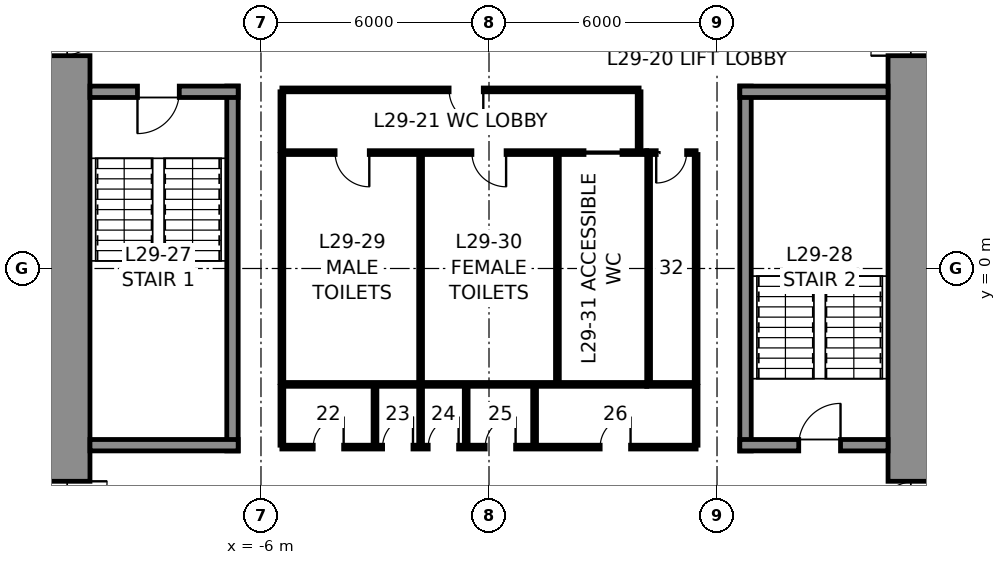
"""IFC4 building model, lengths in metres.
Left out: names, types, materials, properties, quantities, classifications, styles, units other than length and angle.
Written with IfcOpenShell. Run it as: python <this file> out.ifc"""

import sys

from ifc_helpers import new_model, si_unit, direction, frame, frame_2d, origin, place, context, subcontext, project, spatial, rectangle, extrude, element, fill, save


model = new_model("IFC4")
c1 = context("Model", 3, precision=1e-05, world=origin(), true_north=direction((0.0, 1.0)))
c2 = subcontext(c1, "Body", "Model", "MODEL_VIEW")
j1 = project(units=[si_unit("LENGTHUNIT", "METRE"), si_unit("PLANEANGLEUNIT", "RADIAN")], contexts=[c1])
p1 = place(None, origin())
s1 = spatial("IfcSite", under=j1, at=p1, CompositionType="ELEMENT")
p2 = place(p1, origin())
s2 = spatial("IfcBuilding", under=s1, at=p2, CompositionType="ELEMENT")
p3 = place(p2, frame((0.0, 0.0, 143.8)))
s3 = spatial("IfcBuildingStorey", under=s2, at=p3, CompositionType="ELEMENT", Elevation=143.8)
p4 = place(p3, frame((11.25, 10.5, 0.0), z_axis=(0.0, 0.0, 1.0), x_axis=(0.0, -1.0, 0.0)))
e1 = element("IfcWall", 1, at=p4, inside=s3, PredefinedType="SHEAR", context=c2, shape_type="SweptSolid", body=[
    extrude(rectangle(XDim=21.0, YDim=1.5, at=frame_2d((10.5, 0.0))), origin(), (0.0, 0.0, 1.0), 4.0),
])
p5 = place(p4, frame((3.7, 0.0, 0.0)))
e2 = element("IfcOpeningElement", 2, at=p5, cuts=e1, PredefinedType="OPENING", context=c2, shape_type="SweptSolid", body=[
    extrude(rectangle(XDim=1.2, YDim=2.3, at=frame_2d((0.6, 1.15))), frame((0.0, 0.76, 0.0), z_axis=(0.0, -1.0, 0.0), x_axis=(1.0, 0.0, 0.0)), (0.0, 0.0, 1.0), 1.52),
])
p6 = place(p4, frame((16.1, 0.0, 0.0)))
e3 = element("IfcOpeningElement", 3, at=p6, cuts=e1, PredefinedType="OPENING", context=c2, shape_type="SweptSolid", body=[
    extrude(rectangle(XDim=1.2, YDim=2.3, at=frame_2d((0.6, 1.15))), frame((0.0, 0.76, 0.0), z_axis=(0.0, -1.0, 0.0), x_axis=(1.0, 0.0, 0.0)), (0.0, 0.0, 1.0), 1.52),
])
p7 = place(p3, frame((-11.25, -10.5, 0.0), z_axis=(0.0, 0.0, 1.0), x_axis=(0.0, 1.0, 0.0)))
e4 = element("IfcWall", 4, at=p7, inside=s3, PredefinedType="SHEAR", context=c2, shape_type="SweptSolid", body=[
    extrude(rectangle(XDim=21.0, YDim=1.5, at=frame_2d((10.5, 0.0))), origin(), (0.0, 0.0, 1.0), 4.0),
])
p8 = place(p7, frame((16.1, 0.0, 0.0)))
e5 = element("IfcOpeningElement", 5, at=p8, cuts=e4, PredefinedType="OPENING", context=c2, shape_type="SweptSolid", body=[
    extrude(rectangle(XDim=1.2, YDim=2.3, at=frame_2d((0.6, 1.15))), frame((0.0, 0.76, 0.0), z_axis=(0.0, -1.0, 0.0), x_axis=(1.0, 0.0, 0.0)), (0.0, 0.0, 1.0), 1.52),
])
p9 = place(p7, frame((3.7, 0.0, 0.0)))
e6 = element("IfcOpeningElement", 6, at=p9, cuts=e4, PredefinedType="OPENING", context=c2, shape_type="SweptSolid", body=[
    extrude(rectangle(XDim=1.2, YDim=2.3, at=frame_2d((0.6, 1.15))), frame((0.0, 0.76, 0.0), z_axis=(0.0, -1.0, 0.0), x_axis=(1.0, 0.0, 0.0)), (0.0, 0.0, 1.0), 1.52),
])
p10 = place(p3, frame((-6.75, -4.8, 0.0), z_axis=(0.0, 0.0, 1.0), x_axis=(0.0, 1.0, 0.0)))
e7 = element("IfcWall", 7, at=p10, inside=s3, PredefinedType="SOLIDWALL", context=c2, shape_type="SweptSolid", body=[
    extrude(rectangle(XDim=9.6, YDim=0.3, at=frame_2d((4.8, 0.0))), origin(), (0.0, 0.0, 1.0), 3.75),
])
p11 = place(p3, frame((-10.5, 4.65, 0.0), z_axis=(0.0, 0.0, 1.0), x_axis=(1.0, 0.0, 0.0)))
e8 = element("IfcWall", 8, at=p11, inside=s3, PredefinedType="SOLIDWALL", context=c2, shape_type="SweptSolid", body=[
    extrude(rectangle(XDim=3.9, YDim=0.3, at=frame_2d((1.95, 0.0))), origin(), (0.0, 0.0, 1.0), 3.75),
])
p12 = place(p11, frame((1.25, 0.0, 0.0)))
e9 = element("IfcOpeningElement", 9, at=p12, cuts=e8, PredefinedType="OPENING", context=c2, shape_type="SweptSolid", body=[
    extrude(rectangle(XDim=1.1, YDim=2.3, at=frame_2d((0.55, 1.15))), frame((0.0, 0.16, 0.0), z_axis=(0.0, -1.0, 0.0), x_axis=(1.0, 0.0, 0.0)), (0.0, 0.0, 1.0), 0.32),
])
p13 = place(p3, frame((-6.6, -4.65, 0.0), z_axis=(0.0, 0.0, 1.0), x_axis=(-1.0, 0.0, 0.0)))
e10 = element("IfcWall", 10, at=p13, inside=s3, PredefinedType="SOLIDWALL", context=c2, shape_type="SweptSolid", body=[
    extrude(rectangle(XDim=3.9, YDim=0.3, at=frame_2d((1.95, 0.0))), origin(), (0.0, 0.0, 1.0), 3.75),
])
p14 = place(p3, frame((6.75, -4.8, 0.0), z_axis=(0.0, 0.0, 1.0), x_axis=(0.0, 1.0, 0.0)))
e11 = element("IfcWall", 11, at=p14, inside=s3, PredefinedType="SOLIDWALL", context=c2, shape_type="SweptSolid", body=[
    extrude(rectangle(XDim=9.6, YDim=0.3, at=frame_2d((4.8, 0.0))), origin(), (0.0, 0.0, 1.0), 3.75),
])
p15 = place(p3, frame((6.6, 4.65, 0.0), z_axis=(0.0, 0.0, 1.0), x_axis=(1.0, 0.0, 0.0)))
e12 = element("IfcWall", 12, at=p15, inside=s3, PredefinedType="SOLIDWALL", context=c2, shape_type="SweptSolid", body=[
    extrude(rectangle(XDim=3.9, YDim=0.3, at=frame_2d((1.95, 0.0))), origin(), (0.0, 0.0, 1.0), 3.75),
])
p16 = place(p3, frame((10.5, -4.65, 0.0), z_axis=(0.0, 0.0, 1.0), x_axis=(-1.0, 0.0, 0.0)))
e13 = element("IfcWall", 13, at=p16, inside=s3, PredefinedType="SOLIDWALL", context=c2, shape_type="SweptSolid", body=[
    extrude(rectangle(XDim=3.9, YDim=0.3, at=frame_2d((1.95, 0.0))), origin(), (0.0, 0.0, 1.0), 3.75),
])
p17 = place(p16, frame((1.25, 0.0, 0.0)))
e14 = element("IfcOpeningElement", 14, at=p17, cuts=e13, PredefinedType="OPENING", context=c2, shape_type="SweptSolid", body=[
    extrude(rectangle(XDim=1.1, YDim=2.3, at=frame_2d((0.55, 1.15))), frame((0.0, 0.16, 0.0), z_axis=(0.0, -1.0, 0.0), x_axis=(1.0, 0.0, 0.0)), (0.0, 0.0, 1.0), 0.32),
])
p18 = place(p3, frame((-5.45, 3.05, 0.0), z_axis=(0.0, 0.0, 1.0), x_axis=(1.0, 0.0, 0.0)))
e15 = element("IfcWall", 15, at=p18, inside=s3, PredefinedType="PARTITIONING", context=c2, shape_type="SweptSolid", body=[
    extrude(rectangle(XDim=9.6, YDim=0.1, at=frame_2d((4.8, 0.0))), origin(), (0.0, 0.0, 1.0), 3.75),
])
p19 = place(p18, frame((1.4, 0.0, 0.0)))
e16 = element("IfcOpeningElement", 16, at=p19, cuts=e15, PredefinedType="OPENING", context=c2, shape_type="SweptSolid", body=[
    extrude(rectangle(XDim=0.9, YDim=2.3, at=frame_2d((0.45, 1.15))), frame((0.0, 0.06, 0.0), z_axis=(0.0, -1.0, 0.0), x_axis=(1.0, 0.0, 0.0)), (0.0, 0.0, 1.0), 0.12),
])
p20 = place(p18, frame((5.0, 0.0, 0.0)))
e17 = element("IfcOpeningElement", 17, at=p20, cuts=e15, PredefinedType="OPENING", context=c2, shape_type="SweptSolid", body=[
    extrude(rectangle(XDim=0.9, YDim=2.3, at=frame_2d((0.45, 1.15))), frame((0.0, 0.06, 0.0), z_axis=(0.0, -1.0, 0.0), x_axis=(1.0, 0.0, 0.0)), (0.0, 0.0, 1.0), 0.12),
])
p21 = place(p18, frame((7.95, 0.0, 0.0)))
e18 = element("IfcOpeningElement", 18, at=p21, cuts=e15, PredefinedType="OPENING", context=c2, shape_type="SweptSolid", body=[
    extrude(rectangle(XDim=1.0, YDim=2.3, at=frame_2d((0.5, 1.15))), frame((0.0, 0.06, 0.0), z_axis=(0.0, -1.0, 0.0), x_axis=(1.0, 0.0, 0.0)), (0.0, 0.0, 1.0), 0.12),
])
p22 = place(p3, frame((4.15, 3.05, 0.0), z_axis=(0.0, 0.0, 1.0), x_axis=(1.0, 0.0, 0.0)))
e19 = element("IfcWall", 19, at=p22, inside=s3, PredefinedType="PARTITIONING", context=c2, shape_type="SweptSolid", body=[
    extrude(rectangle(XDim=1.3, YDim=0.1, at=frame_2d((0.65, 0.0))), origin(), (0.0, 0.0, 1.0), 3.75),
])
p23 = place(p22, frame((0.25, 0.0, 0.0)))
e20 = element("IfcOpeningElement", 20, at=p23, cuts=e19, PredefinedType="OPENING", context=c2, shape_type="SweptSolid", body=[
    extrude(rectangle(XDim=0.8, YDim=2.3, at=frame_2d((0.4, 1.15))), frame((0.0, 0.06, 0.0), z_axis=(0.0, -1.0, 0.0), x_axis=(1.0, 0.0, 0.0)), (0.0, 0.0, 1.0), 0.12),
])
p24 = place(p3, frame((4.15, -3.05, 0.0), z_axis=(0.0, 0.0, 1.0), x_axis=(-1.0, 0.0, 0.0)))
e21 = element("IfcWall", 21, at=p24, inside=s3, PredefinedType="PARTITIONING", context=c2, shape_type="SweptSolid", body=[
    extrude(rectangle(XDim=9.6, YDim=0.1, at=frame_2d((4.8, 0.0))), origin(), (0.0, 0.0, 1.0), 3.75),
])
p25 = place(p3, frame((5.45, -3.05, 0.0), z_axis=(0.0, 0.0, 1.0), x_axis=(-1.0, 0.0, 0.0)))
e22 = element("IfcWall", 22, at=p25, inside=s3, PredefinedType="PARTITIONING", context=c2, shape_type="SweptSolid", body=[
    extrude(rectangle(XDim=1.3, YDim=0.1, at=frame_2d((0.65, 0.0))), origin(), (0.0, 0.0, 1.0), 3.75),
])
for number, where, z_axis, x_axis in (
    (23, (5.45, 3.0, 0.0), (0.0, 0.0, 1.0), (0.0, -1.0, 0.0)),
    (24, (-5.45, -3.0, 0.0), (0.0, 0.0, 1.0), (0.0, 1.0, 0.0)),
    (25, (-1.8, -3.0, 0.0), (0.0, 0.0, 1.0), (0.0, 1.0, 0.0)),
    (26, (1.8, -3.0, 0.0), (0.0, 0.0, 1.0), (0.0, 1.0, 0.0)),
    (27, (4.2, -3.0, 0.0), (0.0, 0.0, 1.0), (0.0, 1.0, 0.0)),
):
    element("IfcWall", number, at=place(p3, frame(where, z_axis=z_axis, x_axis=x_axis)), inside=s3, PredefinedType="PARTITIONING", context=c2, shape_type="SweptSolid", body=[
        extrude(rectangle(XDim=6.0, YDim=0.1, at=frame_2d((3.0, 0.0))), origin(), (0.0, 0.0, 1.0), 3.75),
    ])
p26 = place(p3, frame((-5.45, 4.7, 0.0), z_axis=(0.0, 0.0, 1.0), x_axis=(1.0, 0.0, 0.0)))
e28 = element("IfcWall", 28, at=p26, inside=s3, PredefinedType="PARTITIONING", context=c2, shape_type="SweptSolid", body=[
    extrude(rectangle(XDim=9.4, YDim=0.1, at=frame_2d((4.7, 0.0))), origin(), (0.0, 0.0, 1.0), 3.75),
])
p27 = place(p26, frame((4.4, 0.0, 0.0)))
e29 = element("IfcOpeningElement", 29, at=p27, cuts=e28, PredefinedType="OPENING", context=c2, shape_type="SweptSolid", body=[
    extrude(rectangle(XDim=0.9, YDim=2.3, at=frame_2d((0.45, 1.15))), frame((0.0, 0.06, 0.0), z_axis=(0.0, -1.0, 0.0), x_axis=(1.0, 0.0, 0.0)), (0.0, 0.0, 1.0), 0.12),
])
for number, where, z_axis, x_axis in (
    (30, (-5.45, 3.1, 0.0), (0.0, 0.0, 1.0), (0.0, 1.0, 0.0)),
    (31, (3.95, 3.1, 0.0), (0.0, 0.0, 1.0), (0.0, 1.0, 0.0)),
):
    element("IfcWall", number, at=place(p3, frame(where, z_axis=z_axis, x_axis=x_axis)), inside=s3, PredefinedType="PARTITIONING", context=c2, shape_type="SweptSolid", body=[
        extrude(rectangle(XDim=1.55, YDim=0.1, at=frame_2d((0.775, 0.0))), origin(), (0.0, 0.0, 1.0), 3.75),
    ])
p28 = place(p3, frame((5.45, -4.7, 0.0), z_axis=(0.0, 0.0, 1.0), x_axis=(-1.0, 0.0, 0.0)))
e32 = element("IfcWall", 32, at=p28, inside=s3, PredefinedType="PARTITIONING", context=c2, shape_type="SweptSolid", body=[
    extrude(rectangle(XDim=10.9, YDim=0.1, at=frame_2d((5.45, 0.0))), origin(), (0.0, 0.0, 1.0), 3.75),
])
p29 = place(p28, frame((9.275, 0.0, 0.0)))
e33 = element("IfcOpeningElement", 33, at=p29, cuts=e32, PredefinedType="OPENING", context=c2, shape_type="SweptSolid", body=[
    extrude(rectangle(XDim=0.8, YDim=2.3, at=frame_2d((0.4, 1.15))), frame((0.0, 0.06, 0.0), z_axis=(0.0, -1.0, 0.0), x_axis=(1.0, 0.0, 0.0)), (0.0, 0.0, 1.0), 0.12),
])
p30 = place(p28, frame((7.45, 0.0, 0.0)))
e34 = element("IfcOpeningElement", 34, at=p30, cuts=e32, PredefinedType="OPENING", context=c2, shape_type="SweptSolid", body=[
    extrude(rectangle(XDim=0.8, YDim=2.3, at=frame_2d((0.4, 1.15))), frame((0.0, 0.06, 0.0), z_axis=(0.0, -1.0, 0.0), x_axis=(1.0, 0.0, 0.0)), (0.0, 0.0, 1.0), 0.12),
])
p31 = place(p28, frame((6.25, 0.0, 0.0)))
e35 = element("IfcOpeningElement", 35, at=p31, cuts=e32, PredefinedType="OPENING", context=c2, shape_type="SweptSolid", body=[
    extrude(rectangle(XDim=0.8, YDim=2.3, at=frame_2d((0.4, 1.15))), frame((0.0, 0.06, 0.0), z_axis=(0.0, -1.0, 0.0), x_axis=(1.0, 0.0, 0.0)), (0.0, 0.0, 1.0), 0.12),
])
p32 = place(p28, frame((4.75, 0.0, 0.0)))
e36 = element("IfcOpeningElement", 36, at=p32, cuts=e32, PredefinedType="OPENING", context=c2, shape_type="SweptSolid", body=[
    extrude(rectangle(XDim=0.8, YDim=2.3, at=frame_2d((0.4, 1.15))), frame((0.0, 0.06, 0.0), z_axis=(0.0, -1.0, 0.0), x_axis=(1.0, 0.0, 0.0)), (0.0, 0.0, 1.0), 0.12),
])
p33 = place(p28, frame((1.725, 0.0, 0.0)))
e37 = element("IfcOpeningElement", 37, at=p33, cuts=e32, PredefinedType="OPENING", context=c2, shape_type="SweptSolid", body=[
    extrude(rectangle(XDim=0.8, YDim=2.3, at=frame_2d((0.4, 1.15))), frame((0.0, 0.06, 0.0), z_axis=(0.0, -1.0, 0.0), x_axis=(1.0, 0.0, 0.0)), (0.0, 0.0, 1.0), 0.12),
])
for number, where, z_axis, x_axis in (
    (38, (-5.45, -3.1, 0.0), (0.0, 0.0, 1.0), (0.0, -1.0, 0.0)),
    (39, (5.45, -3.1, 0.0), (0.0, 0.0, 1.0), (0.0, -1.0, 0.0)),
    (40, (-3.0, -3.1, 0.0), (0.0, 0.0, 1.0), (0.0, -1.0, 0.0)),
    (41, (-1.8, -3.1, 0.0), (0.0, 0.0, 1.0), (0.0, -1.0, 0.0)),
    (42, (-0.6, -3.1, 0.0), (0.0, 0.0, 1.0), (0.0, -1.0, 0.0)),
    (43, (1.2, -3.1, 0.0), (0.0, 0.0, 1.0), (0.0, -1.0, 0.0)),
):
    element("IfcWall", number, at=place(p3, frame(where, z_axis=z_axis, x_axis=x_axis)), inside=s3, PredefinedType="PARTITIONING", context=c2, shape_type="SweptSolid", body=[
        extrude(rectangle(XDim=1.55, YDim=0.1, at=frame_2d((0.775, 0.0))), origin(), (0.0, 0.0, 1.0), 3.75),
    ])
p34 = place(p12, frame((1.1, 0.0, 0.0), z_axis=(0.0, 0.0, 1.0), x_axis=(-1.0, 0.0, 0.0)))
e44 = element("IfcDoor", 44, at=p34, inside=s3, OperationType="SINGLE_SWING_RIGHT", PredefinedType="DOOR", context=c2, shape_type="SweptSolid", body=[
    extrude(rectangle(XDim=1.1, YDim=2.3, at=frame_2d((0.55, 1.15))), frame((0.0, 0.025, 0.0), z_axis=(0.0, -1.0, 0.0), x_axis=(1.0, 0.0, 0.0)), (0.0, 0.0, 1.0), 0.05),
])
fill(e9, e44)
p35 = place(p17, frame((1.1, 0.0, 0.0), z_axis=(0.0, 0.0, 1.0), x_axis=(-1.0, 0.0, 0.0)))
e45 = element("IfcDoor", 45, at=p35, inside=s3, OperationType="SINGLE_SWING_RIGHT", PredefinedType="DOOR", context=c2, shape_type="SweptSolid", body=[
    extrude(rectangle(XDim=1.1, YDim=2.3, at=frame_2d((0.55, 1.15))), frame((0.0, 0.025, 0.0), z_axis=(0.0, -1.0, 0.0), x_axis=(1.0, 0.0, 0.0)), (0.0, 0.0, 1.0), 0.05),
])
fill(e14, e45)
p36 = place(p19, frame((0.9, 0.0, 0.0), z_axis=(0.0, 0.0, 1.0), x_axis=(-1.0, 0.0, 0.0)))
e46 = element("IfcDoor", 46, at=p36, inside=s3, OperationType="SINGLE_SWING_LEFT", PredefinedType="DOOR", context=c2, shape_type="SweptSolid", body=[
    extrude(rectangle(XDim=0.9, YDim=2.3, at=frame_2d((0.45, 1.15))), frame((0.0, 0.025, 0.0), z_axis=(0.0, -1.0, 0.0), x_axis=(1.0, 0.0, 0.0)), (0.0, 0.0, 1.0), 0.05),
])
fill(e16, e46)
p37 = place(p20, frame((0.9, 0.0, 0.0), z_axis=(0.0, 0.0, 1.0), x_axis=(-1.0, 0.0, 0.0)))
e47 = element("IfcDoor", 47, at=p37, inside=s3, OperationType="SINGLE_SWING_LEFT", PredefinedType="DOOR", context=c2, shape_type="SweptSolid", body=[
    extrude(rectangle(XDim=0.9, YDim=2.3, at=frame_2d((0.45, 1.15))), frame((0.0, 0.025, 0.0), z_axis=(0.0, -1.0, 0.0), x_axis=(1.0, 0.0, 0.0)), (0.0, 0.0, 1.0), 0.05),
])
fill(e17, e47)
p38 = place(p21, frame((1.0, 0.0, 0.0), z_axis=(0.0, 0.0, 1.0), x_axis=(-1.0, 0.0, 0.0)))
e48 = element("IfcDoor", 48, at=p38, inside=s3, OperationType="SLIDING_TO_LEFT", PredefinedType="DOOR", context=c2, shape_type="SweptSolid", body=[
    extrude(rectangle(XDim=1.0, YDim=2.3, at=frame_2d((0.5, 1.15))), frame((0.0, 0.025, 0.0), z_axis=(0.0, -1.0, 0.0), x_axis=(1.0, 0.0, 0.0)), (0.0, 0.0, 1.0), 0.05),
])
fill(e18, e48)
p39 = place(p23, frame((0.8, 0.0, 0.0), z_axis=(0.0, 0.0, 1.0), x_axis=(-1.0, 0.0, 0.0)))
e49 = element("IfcDoor", 49, at=p39, inside=s3, OperationType="SINGLE_SWING_RIGHT", PredefinedType="DOOR", context=c2, shape_type="SweptSolid", body=[
    extrude(rectangle(XDim=0.8, YDim=2.3, at=frame_2d((0.4, 1.15))), frame((0.0, 0.025, 0.0), z_axis=(0.0, -1.0, 0.0), x_axis=(1.0, 0.0, 0.0)), (0.0, 0.0, 1.0), 0.05),
])
fill(e20, e49)
p40 = place(p27, frame((0.9, 0.0, 0.0), z_axis=(0.0, 0.0, 1.0), x_axis=(-1.0, 0.0, 0.0)))
e50 = element("IfcDoor", 50, at=p40, inside=s3, OperationType="SINGLE_SWING_LEFT", PredefinedType="DOOR", context=c2, shape_type="SweptSolid", body=[
    extrude(rectangle(XDim=0.9, YDim=2.3, at=frame_2d((0.45, 1.15))), frame((0.0, 0.025, 0.0), z_axis=(0.0, -1.0, 0.0), x_axis=(1.0, 0.0, 0.0)), (0.0, 0.0, 1.0), 0.05),
])
fill(e29, e50)
p41 = place(p29, frame((0.8, 0.0, 0.0), z_axis=(0.0, 0.0, 1.0), x_axis=(-1.0, 0.0, 0.0)))
e51 = element("IfcDoor", 51, at=p41, inside=s3, OperationType="SINGLE_SWING_RIGHT", PredefinedType="DOOR", context=c2, shape_type="SweptSolid", body=[
    extrude(rectangle(XDim=0.8, YDim=2.3, at=frame_2d((0.4, 1.15))), frame((0.0, 0.025, 0.0), z_axis=(0.0, -1.0, 0.0), x_axis=(1.0, 0.0, 0.0)), (0.0, 0.0, 1.0), 0.05),
])
fill(e33, e51)
p42 = place(p30, frame((0.8, 0.0, 0.0), z_axis=(0.0, 0.0, 1.0), x_axis=(-1.0, 0.0, 0.0)))
e52 = element("IfcDoor", 52, at=p42, inside=s3, OperationType="SINGLE_SWING_RIGHT", PredefinedType="DOOR", context=c2, shape_type="SweptSolid", body=[
    extrude(rectangle(XDim=0.8, YDim=2.3, at=frame_2d((0.4, 1.15))), frame((0.0, 0.025, 0.0), z_axis=(0.0, -1.0, 0.0), x_axis=(1.0, 0.0, 0.0)), (0.0, 0.0, 1.0), 0.05),
])
fill(e34, e52)
p43 = place(p31, frame((0.8, 0.0, 0.0), z_axis=(0.0, 0.0, 1.0), x_axis=(-1.0, 0.0, 0.0)))
e53 = element("IfcDoor", 53, at=p43, inside=s3, OperationType="SINGLE_SWING_RIGHT", PredefinedType="DOOR", context=c2, shape_type="SweptSolid", body=[
    extrude(rectangle(XDim=0.8, YDim=2.3, at=frame_2d((0.4, 1.15))), frame((0.0, 0.025, 0.0), z_axis=(0.0, -1.0, 0.0), x_axis=(1.0, 0.0, 0.0)), (0.0, 0.0, 1.0), 0.05),
])
fill(e35, e53)
p44 = place(p32, frame((0.8, 0.0, 0.0), z_axis=(0.0, 0.0, 1.0), x_axis=(-1.0, 0.0, 0.0)))
e54 = element("IfcDoor", 54, at=p44, inside=s3, OperationType="SINGLE_SWING_RIGHT", PredefinedType="DOOR", context=c2, shape_type="SweptSolid", body=[
    extrude(rectangle(XDim=0.8, YDim=2.3, at=frame_2d((0.4, 1.15))), frame((0.0, 0.025, 0.0), z_axis=(0.0, -1.0, 0.0), x_axis=(1.0, 0.0, 0.0)), (0.0, 0.0, 1.0), 0.05),
])
fill(e36, e54)
p45 = place(p33, frame((0.8, 0.0, 0.0), z_axis=(0.0, 0.0, 1.0), x_axis=(-1.0, 0.0, 0.0)))
e55 = element("IfcDoor", 55, at=p45, inside=s3, OperationType="SINGLE_SWING_RIGHT", PredefinedType="DOOR", context=c2, shape_type="SweptSolid", body=[
    extrude(rectangle(XDim=0.8, YDim=2.3, at=frame_2d((0.4, 1.15))), frame((0.0, 0.025, 0.0), z_axis=(0.0, -1.0, 0.0), x_axis=(1.0, 0.0, 0.0)), (0.0, 0.0, 1.0), 0.05),
])
fill(e37, e55)
p46 = place(p8, frame((1.2, 0.0, 0.0), z_axis=(0.0, 0.0, 1.0), x_axis=(-1.0, 0.0, 0.0)))
e56 = element("IfcDoor", 56, at=p46, inside=s3, OperationType="SINGLE_SWING_LEFT", PredefinedType="DOOR", context=c2, shape_type="SweptSolid", body=[
    extrude(rectangle(XDim=1.2, YDim=2.3, at=frame_2d((0.6, 1.15))), frame((0.0, 0.025, 0.0), z_axis=(0.0, -1.0, 0.0), x_axis=(1.0, 0.0, 0.0)), (0.0, 0.0, 1.0), 0.05),
])
fill(e5, e56)
p47 = place(p9, frame((1.2, 0.0, 0.0), z_axis=(0.0, 0.0, 1.0), x_axis=(-1.0, 0.0, 0.0)))
e57 = element("IfcDoor", 57, at=p47, inside=s3, OperationType="SINGLE_SWING_LEFT", PredefinedType="DOOR", context=c2, shape_type="SweptSolid", body=[
    extrude(rectangle(XDim=1.2, YDim=2.3, at=frame_2d((0.6, 1.15))), frame((0.0, 0.025, 0.0), z_axis=(0.0, -1.0, 0.0), x_axis=(1.0, 0.0, 0.0)), (0.0, 0.0, 1.0), 0.05),
])
fill(e6, e57)
p48 = place(p5, frame((1.2, 0.0, 0.0), z_axis=(0.0, 0.0, 1.0), x_axis=(-1.0, 0.0, 0.0)))
e58 = element("IfcDoor", 58, at=p48, inside=s3, OperationType="SINGLE_SWING_LEFT", PredefinedType="DOOR", context=c2, shape_type="SweptSolid", body=[
    extrude(rectangle(XDim=1.2, YDim=2.3, at=frame_2d((0.6, 1.15))), frame((0.0, 0.025, 0.0), z_axis=(0.0, -1.0, 0.0), x_axis=(1.0, 0.0, 0.0)), (0.0, 0.0, 1.0), 0.05),
])
fill(e2, e58)
p49 = place(p6, frame((1.2, 0.0, 0.0), z_axis=(0.0, 0.0, 1.0), x_axis=(-1.0, 0.0, 0.0)))
e59 = element("IfcDoor", 59, at=p49, inside=s3, OperationType="SINGLE_SWING_LEFT", PredefinedType="DOOR", context=c2, shape_type="SweptSolid", body=[
    extrude(rectangle(XDim=1.2, YDim=2.3, at=frame_2d((0.6, 1.15))), frame((0.0, 0.025, 0.0), z_axis=(0.0, -1.0, 0.0), x_axis=(1.0, 0.0, 0.0)), (0.0, 0.0, 1.0), 0.05),
])
fill(e3, e59)
save(model, sys.argv[1])
